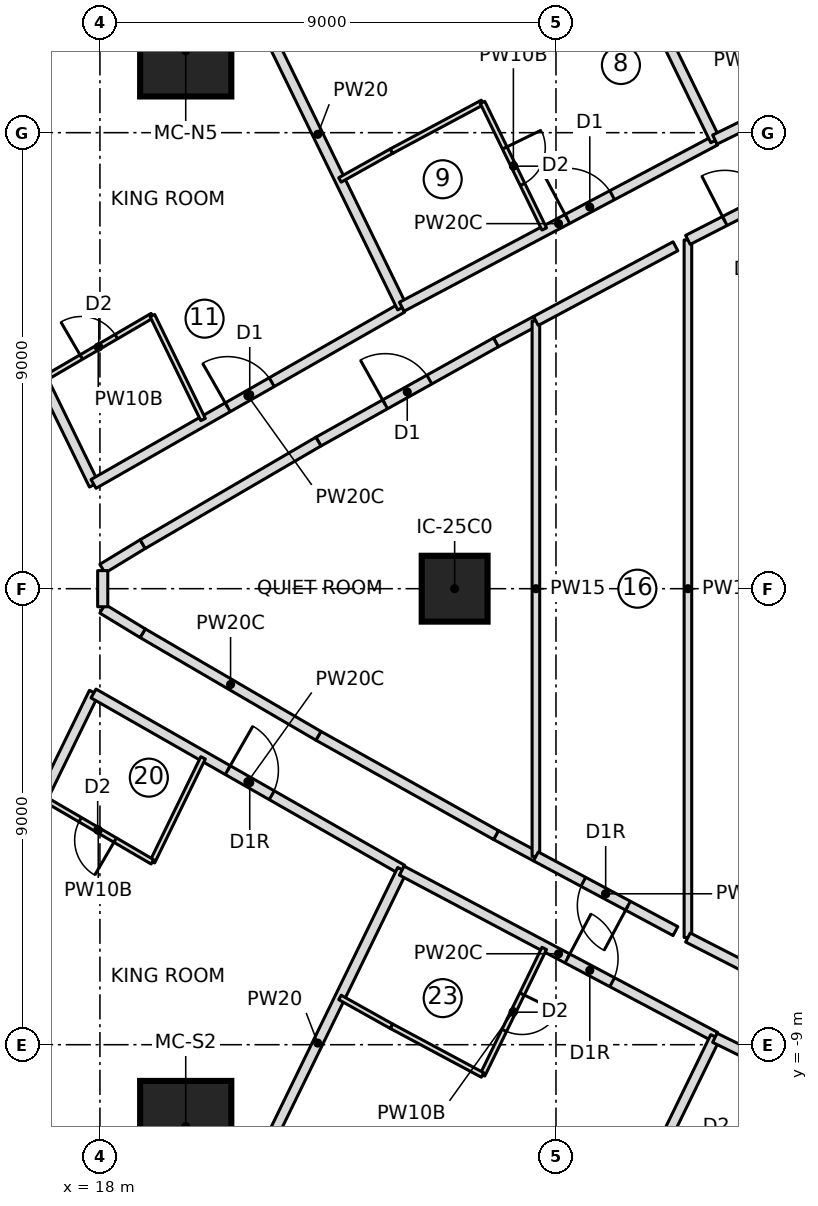
"""IFC4 building model, lengths in metres.
Left out: names, types, materials, properties, quantities, classifications, styles, units other than length and angle.
Written with IfcOpenShell. Run it as: python <this file> out.ifc"""

import sys

from ifc_helpers import new_model, si_unit, direction, frame, frame_2d, origin, origin_2d, place, context, subcontext, project, spatial, rectangle, extrude, element, fill, save


model = new_model("IFC4")
c1 = context("Model", 3, precision=1e-05, world=origin(), true_north=direction((0.0, 1.0)))
c2 = subcontext(c1, "Body", "Model", "MODEL_VIEW")
j1 = project(units=[si_unit("LENGTHUNIT", "METRE"), si_unit("PLANEANGLEUNIT", "RADIAN")], contexts=[c1])
p1 = place(None, origin())
s1 = spatial("IfcSite", under=j1, at=p1, CompositionType="ELEMENT")
p2 = place(p1, origin())
s2 = spatial("IfcBuilding", under=s1, at=p2, CompositionType="ELEMENT")
p3 = place(p2, frame((0.0, 0.0, 68.0)))
s3 = spatial("IfcBuildingStorey", under=s2, at=p3, CompositionType="ELEMENT", Elevation=68.0)
for number, where, z_axis, x_axis in (
    (1, (19.693, -10.615, 0.0), (0.0, 0.0, 1.0), (1.0, 0.0, 0.0)),
    (2, (19.693, 10.615, 0.0), (0.0, 0.0, 1.0), (1.0, 0.0, 0.0)),
):
    element("IfcColumn", number, at=place(p3, frame(where, z_axis=z_axis, x_axis=x_axis)), inside=s3, PredefinedType="COLUMN", context=c2, shape_type="SweptSolid", body=[
        extrude(rectangle(XDim=1.8, YDim=1.8, at=origin_2d()), origin(), (0.0, 0.0, 1.0), 3.55),
    ])
p4 = place(p3, frame((25.0, 0.0, 0.0), z_axis=(0.0, 0.0, 1.0), x_axis=(1.0, 0.0, 0.0)))
e3 = element("IfcColumn", 3, at=p4, inside=s3, PredefinedType="COLUMN", context=c2, shape_type="SweptSolid", body=[
    extrude(rectangle(XDim=1.3, YDim=1.3, at=origin_2d()), origin(), (0.0, 0.0, 1.0), 3.55),
])
p5 = place(p3, frame((17.882, 2.05, 0.0), z_axis=(0.0, 0.0, 1.0), x_axis=(-0.438213564788, 0.898870887078, 0.0)))
e4 = element("IfcWall", 4, at=p5, inside=s3, PredefinedType="PARTITIONING", context=c2, shape_type="SweptSolid", body=[
    extrude(rectangle(XDim=7.625, YDim=0.2, at=frame_2d((3.813, 0.0))), origin(), (0.0, 0.0, 1.0), 3.25),
])
p6 = place(p3, frame((17.874, 2.068, 0.0), z_axis=(0.0, 0.0, 1.0), x_axis=(0.868427275315, 0.495816566373, 0.0)))
e5 = element("IfcWall", 5, at=p6, inside=s3, PredefinedType="PARTITIONING", context=c2, shape_type="SweptSolid", body=[
    extrude(rectangle(XDim=7.015, YDim=0.2, at=frame_2d((3.507, 0.0))), origin(), (0.0, 0.0, 1.0), 3.25),
])
p7 = place(p6, frame((3.05, 0.0, 0.0)))
e6 = element("IfcOpeningElement", 6, at=p7, cuts=e5, PredefinedType="OPENING", context=c2, shape_type="SweptSolid", body=[
    extrude(rectangle(XDim=1.0, YDim=2.1, at=frame_2d((0.5, 1.05))), frame((0.0, 0.11, 0.0), z_axis=(0.0, -1.0, 0.0), x_axis=(1.0, 0.0, 0.0)), (0.0, 0.0, 1.0), 0.22),
])
p8 = place(p3, frame((16.898, 4.144, 0.0), z_axis=(0.0, 0.0, 1.0), x_axis=(0.863707305865, 0.503993739837, 0.0)))
e7 = element("IfcWall", 7, at=p8, inside=s3, PredefinedType="PARTITIONING", context=c2, shape_type="SweptSolid", body=[
    extrude(rectangle(XDim=2.474, YDim=0.1, at=frame_2d((1.237, 0.0))), origin(), (0.0, 0.0, 1.0), 3.25),
])
p9 = place(p8, frame((0.85, 0.0, 0.0)))
e8 = element("IfcOpeningElement", 8, at=p9, cuts=e7, PredefinedType="OPENING", context=c2, shape_type="SweptSolid", body=[
    extrude(rectangle(XDim=0.8, YDim=2.1, at=frame_2d((0.4, 1.05))), frame((0.0, 0.06, 0.0), z_axis=(0.0, -1.0, 0.0), x_axis=(1.0, 0.0, 0.0)), (0.0, 0.0, 1.0), 0.12),
])
p10 = place(p3, frame((19.035, 5.39, 0.0), z_axis=(0.0, 0.0, 1.0), x_axis=(0.438122322582, -0.898915363344, 0.0)))
e9 = element("IfcWall", 9, at=p10, inside=s3, PredefinedType="PARTITIONING", context=c2, shape_type="SweptSolid", body=[
    extrude(rectangle(XDim=2.283, YDim=0.1, at=frame_2d((1.142, 0.0))), origin(), (0.0, 0.0, 1.0), 3.25),
])
p11 = place(p3, frame((23.965, 5.546, 0.0), z_axis=(0.0, 0.0, 1.0), x_axis=(-0.438184754816, 0.898884931816, 0.0)))
e10 = element("IfcWall", 10, at=p11, inside=s3, PredefinedType="PARTITIONING", context=c2, shape_type="SweptSolid", body=[
    extrude(rectangle(XDim=7.612, YDim=0.2, at=frame_2d((3.806, 0.0))), origin(), (0.0, 0.0, 1.0), 3.25),
])
p12 = place(p3, frame((23.957, 5.564, 0.0), z_axis=(0.0, 0.0, 1.0), x_axis=(0.883455325405, 0.468515408513, 0.0)))
e11 = element("IfcWall", 11, at=p12, inside=s3, PredefinedType="PARTITIONING", context=c2, shape_type="SweptSolid", body=[
    extrude(rectangle(XDim=7.004, YDim=0.2, at=frame_2d((3.502, 0.0))), origin(), (0.0, 0.0, 1.0), 3.25),
])
p13 = place(p12, frame((3.7, 0.0, 0.0)))
e12 = element("IfcOpeningElement", 12, at=p13, cuts=e11, PredefinedType="OPENING", context=c2, shape_type="SweptSolid", body=[
    extrude(rectangle(XDim=1.0, YDim=2.1, at=frame_2d((0.5, 1.05))), frame((0.0, 0.11, 0.0), z_axis=(0.0, -1.0, 0.0), x_axis=(1.0, 0.0, 0.0)), (0.0, 0.0, 1.0), 0.22),
])
p14 = place(p3, frame((22.737, 8.067, 0.0), z_axis=(0.0, 0.0, 1.0), x_axis=(0.872799020153, 0.488079778745, 0.0)))
e13 = element("IfcWall", 13, at=p14, inside=s3, PredefinedType="PARTITIONING", context=c2, shape_type="SweptSolid", body=[
    extrude(rectangle(XDim=1.165, YDim=0.1, at=frame_2d((0.582, 0.0))), origin(), (0.0, 0.0, 1.0), 3.25),
])
p15 = place(p3, frame((23.753, 8.635, 0.0), z_axis=(0.0, 0.0, 1.0), x_axis=(0.881675736231, 0.471855800156, 0.0)))
e14 = element("IfcWall", 14, at=p15, inside=s3, PredefinedType="PARTITIONING", context=c2, shape_type="SweptSolid", body=[
    extrude(rectangle(XDim=2.039, YDim=0.1, at=frame_2d((1.019, 0.0))), origin(), (0.0, 0.0, 1.0), 3.25),
])
p16 = place(p3, frame((25.55, 9.597, 0.0), z_axis=(0.0, 0.0, 1.0), x_axis=(0.43822975423, -0.898862994292, 0.0)))
e15 = element("IfcWall", 15, at=p16, inside=s3, PredefinedType="PARTITIONING", context=c2, shape_type="SweptSolid", body=[
    extrude(rectangle(XDim=2.779, YDim=0.1, at=frame_2d((1.389, 0.0))), origin(), (0.0, 0.0, 1.0), 3.25),
])
p17 = place(p16, frame((1.0, 0.0, 0.0)))
e16 = element("IfcOpeningElement", 16, at=p17, cuts=e15, PredefinedType="OPENING", context=c2, shape_type="SweptSolid", body=[
    extrude(rectangle(XDim=0.8, YDim=2.1, at=frame_2d((0.4, 1.05))), frame((0.0, 0.06, 0.0), z_axis=(0.0, -1.0, 0.0), x_axis=(1.0, 0.0, 0.0)), (0.0, 0.0, 1.0), 0.12),
])
p18 = place(p3, frame((30.144, 8.846, 0.0), z_axis=(0.0, 0.0, 1.0), x_axis=(-0.438185054829, 0.898884785567, 0.0)))
e17 = element("IfcWall", 17, at=p18, inside=s3, PredefinedType="PARTITIONING", context=c2, shape_type="SweptSolid", body=[
    extrude(rectangle(XDim=7.601, YDim=0.2, at=frame_2d((3.801, 0.0))), origin(), (0.0, 0.0, 1.0), 3.25),
])
p19 = place(p3, frame((30.135, 8.864, 0.0), z_axis=(0.0, 0.0, 1.0), x_axis=(0.897599118183, 0.44081268475, 0.0)))
e18 = element("IfcWall", 18, at=p19, inside=s3, PredefinedType="PARTITIONING", context=c2, shape_type="SweptSolid", body=[
    extrude(rectangle(XDim=7.0, YDim=0.2, at=frame_2d((3.5, 0.0))), origin(), (0.0, 0.0, 1.0), 3.25),
])
p20 = place(p19, frame((4.25, 0.0, 0.0)))
e19 = element("IfcOpeningElement", 19, at=p20, cuts=e18, PredefinedType="OPENING", context=c2, shape_type="SweptSolid", body=[
    extrude(rectangle(XDim=1.0, YDim=2.1, at=frame_2d((0.5, 1.05))), frame((0.0, 0.11, 0.0), z_axis=(0.0, -1.0, 0.0), x_axis=(1.0, 0.0, 0.0)), (0.0, 0.0, 1.0), 0.22),
])
p21 = place(p3, frame((14.541, -8.904, 0.0), z_axis=(0.0, 0.0, 1.0), x_axis=(0.438213564788, 0.898870887078, 0.0)))
e20 = element("IfcWall", 20, at=p21, inside=s3, PredefinedType="PARTITIONING", context=c2, shape_type="SweptSolid", body=[
    extrude(rectangle(XDim=7.625, YDim=0.2, at=frame_2d((3.813, 0.0))), origin(), (0.0, 0.0, 1.0), 3.25),
])
p22 = place(p3, frame((17.874, -2.068, 0.0), z_axis=(0.0, 0.0, 1.0), x_axis=(0.868427275315, -0.495816566373, 0.0)))
e21 = element("IfcWall", 21, at=p22, inside=s3, PredefinedType="PARTITIONING", context=c2, shape_type="SweptSolid", body=[
    extrude(rectangle(XDim=7.015, YDim=0.2, at=frame_2d((3.507, 0.0))), origin(), (0.0, 0.0, 1.0), 3.25),
])
p23 = place(p22, frame((3.05, 0.0, 0.0)))
e22 = element("IfcOpeningElement", 22, at=p23, cuts=e21, PredefinedType="OPENING", context=c2, shape_type="SweptSolid", body=[
    extrude(rectangle(XDim=1.0, YDim=2.1, at=frame_2d((0.5, 1.05))), frame((0.0, 0.11, 0.0), z_axis=(0.0, -1.0, 0.0), x_axis=(1.0, 0.0, 0.0)), (0.0, 0.0, 1.0), 0.22),
])
p24 = place(p3, frame((20.035, -3.338, 0.0), z_axis=(0.0, 0.0, 1.0), x_axis=(-0.438122322582, -0.898915363344, 0.0)))
e23 = element("IfcWall", 23, at=p24, inside=s3, PredefinedType="PARTITIONING", context=c2, shape_type="SweptSolid", body=[
    extrude(rectangle(XDim=2.283, YDim=0.1, at=frame_2d((1.142, 0.0))), origin(), (0.0, 0.0, 1.0), 3.25),
])
p25 = place(p3, frame((19.035, -5.39, 0.0), z_axis=(0.0, 0.0, 1.0), x_axis=(-0.863707305865, 0.503993739837, 0.0)))
e24 = element("IfcWall", 24, at=p25, inside=s3, PredefinedType="PARTITIONING", context=c2, shape_type="SweptSolid", body=[
    extrude(rectangle(XDim=2.474, YDim=0.1, at=frame_2d((1.237, 0.0))), origin(), (0.0, 0.0, 1.0), 3.25),
])
p26 = place(p25, frame((0.85, 0.0, 0.0)))
e25 = element("IfcOpeningElement", 25, at=p26, cuts=e24, PredefinedType="OPENING", context=c2, shape_type="SweptSolid", body=[
    extrude(rectangle(XDim=0.8, YDim=2.1, at=frame_2d((0.4, 1.05))), frame((0.0, 0.06, 0.0), z_axis=(0.0, -1.0, 0.0), x_axis=(1.0, 0.0, 0.0)), (0.0, 0.0, 1.0), 0.12),
])
p27 = place(p3, frame((20.63, -12.388, 0.0), z_axis=(0.0, 0.0, 1.0), x_axis=(0.438184754816, 0.898884931816, 0.0)))
e26 = element("IfcWall", 26, at=p27, inside=s3, PredefinedType="PARTITIONING", context=c2, shape_type="SweptSolid", body=[
    extrude(rectangle(XDim=7.612, YDim=0.2, at=frame_2d((3.806, 0.0))), origin(), (0.0, 0.0, 1.0), 3.25),
])
p28 = place(p3, frame((23.957, -5.564, 0.0), z_axis=(0.0, 0.0, 1.0), x_axis=(0.883455325405, -0.468515408513, 0.0)))
e27 = element("IfcWall", 27, at=p28, inside=s3, PredefinedType="PARTITIONING", context=c2, shape_type="SweptSolid", body=[
    extrude(rectangle(XDim=7.004, YDim=0.2, at=frame_2d((3.502, 0.0))), origin(), (0.0, 0.0, 1.0), 3.25),
])
p29 = place(p28, frame((3.7, 0.0, 0.0)))
e28 = element("IfcOpeningElement", 28, at=p29, cuts=e27, PredefinedType="OPENING", context=c2, shape_type="SweptSolid", body=[
    extrude(rectangle(XDim=1.0, YDim=2.1, at=frame_2d((0.5, 1.05))), frame((0.0, 0.11, 0.0), z_axis=(0.0, -1.0, 0.0), x_axis=(1.0, 0.0, 0.0)), (0.0, 0.0, 1.0), 0.22),
])
p30 = place(p3, frame((26.768, -7.1, 0.0), z_axis=(0.0, 0.0, 1.0), x_axis=(-0.43822975423, -0.898862994292, 0.0)))
e29 = element("IfcWall", 29, at=p30, inside=s3, PredefinedType="PARTITIONING", context=c2, shape_type="SweptSolid", body=[
    extrude(rectangle(XDim=2.779, YDim=0.1, at=frame_2d((1.389, 0.0))), origin(), (0.0, 0.0, 1.0), 3.25),
])
p31 = place(p30, frame((1.0, 0.0, 0.0)))
e30 = element("IfcOpeningElement", 30, at=p31, cuts=e29, PredefinedType="OPENING", context=c2, shape_type="SweptSolid", body=[
    extrude(rectangle(XDim=0.8, YDim=2.1, at=frame_2d((0.4, 1.05))), frame((0.0, 0.06, 0.0), z_axis=(0.0, -1.0, 0.0), x_axis=(1.0, 0.0, 0.0)), (0.0, 0.0, 1.0), 0.12),
])
p32 = place(p3, frame((25.55, -9.597, 0.0), z_axis=(0.0, 0.0, 1.0), x_axis=(-0.881675736231, 0.471855800156, 0.0)))
e31 = element("IfcWall", 31, at=p32, inside=s3, PredefinedType="PARTITIONING", context=c2, shape_type="SweptSolid", body=[
    extrude(rectangle(XDim=2.039, YDim=0.1, at=frame_2d((1.019, 0.0))), origin(), (0.0, 0.0, 1.0), 3.25),
])
p33 = place(p3, frame((23.753, -8.635, 0.0), z_axis=(0.0, 0.0, 1.0), x_axis=(-0.872799020153, 0.488079778745, 0.0)))
e32 = element("IfcWall", 32, at=p33, inside=s3, PredefinedType="PARTITIONING", context=c2, shape_type="SweptSolid", body=[
    extrude(rectangle(XDim=1.165, YDim=0.1, at=frame_2d((0.582, 0.0))), origin(), (0.0, 0.0, 1.0), 3.25),
])
p34 = place(p3, frame((26.813, -15.678, 0.0), z_axis=(0.0, 0.0, 1.0), x_axis=(0.438185054829, 0.898884785567, 0.0)))
e33 = element("IfcWall", 33, at=p34, inside=s3, PredefinedType="PARTITIONING", context=c2, shape_type="SweptSolid", body=[
    extrude(rectangle(XDim=7.601, YDim=0.2, at=frame_2d((3.801, 0.0))), origin(), (0.0, 0.0, 1.0), 3.25),
])
p35 = place(p3, frame((30.135, -8.864, 0.0), z_axis=(0.0, 0.0, 1.0), x_axis=(0.897599118183, -0.44081268475, 0.0)))
e34 = element("IfcWall", 34, at=p35, inside=s3, PredefinedType="PARTITIONING", context=c2, shape_type="SweptSolid", body=[
    extrude(rectangle(XDim=7.0, YDim=0.2, at=frame_2d((3.5, 0.0))), origin(), (0.0, 0.0, 1.0), 3.25),
])
p36 = place(p35, frame((4.25, 0.0, 0.0)))
e35 = element("IfcOpeningElement", 35, at=p36, cuts=e34, PredefinedType="OPENING", context=c2, shape_type="SweptSolid", body=[
    extrude(rectangle(XDim=1.0, YDim=2.1, at=frame_2d((0.5, 1.05))), frame((0.0, 0.11, 0.0), z_axis=(0.0, -1.0, 0.0), x_axis=(1.0, 0.0, 0.0)), (0.0, 0.0, 1.0), 0.22),
])
p37 = place(p3, frame((22.312, 2.903, 0.0), z_axis=(0.0, 0.0, 1.0), x_axis=(0.872800289292, 0.488077509225, 0.0)))
e36 = element("IfcWall", 36, at=p37, inside=s3, PredefinedType="PARTITIONING", context=c2, shape_type="SweptSolid", body=[
    extrude(rectangle(XDim=4.016, YDim=0.2, at=frame_2d((2.008, 0.0))), origin(), (0.0, 0.0, 1.0), 3.25),
])
p38 = place(p37, frame((1.508, 0.0, 0.0)))
e37 = element("IfcOpeningElement", 37, at=p38, cuts=e36, PredefinedType="OPENING", context=c2, shape_type="SweptSolid", body=[
    extrude(rectangle(XDim=1.0, YDim=2.1, at=frame_2d((0.5, 1.05))), frame((0.0, 0.11, 0.0), z_axis=(0.0, -1.0, 0.0), x_axis=(1.0, 0.0, 0.0)), (0.0, 0.0, 1.0), 0.22),
])
p39 = place(p3, frame((26.604, -5.284, 0.0), z_axis=(0.0, 0.0, 1.0), x_axis=(-0.881715816073, 0.471780902207, 0.0)))
e38 = element("IfcWall", 38, at=p39, inside=s3, PredefinedType="PARTITIONING", context=c2, shape_type="SweptSolid", body=[
    extrude(rectangle(XDim=0.892, YDim=0.2, at=frame_2d((0.446, 0.0))), origin(), (0.0, 0.0, 1.0), 3.25),
])
p40 = place(p3, frame((25.817, -4.863, 0.0), z_axis=(0.0, 0.0, 1.0), x_axis=(-0.872800289292, 0.488077509225, 0.0)))
e39 = element("IfcWall", 39, at=p40, inside=s3, PredefinedType="PARTITIONING", context=c2, shape_type="SweptSolid", body=[
    extrude(rectangle(XDim=4.016, YDim=0.2, at=frame_2d((2.008, 0.0))), origin(), (0.0, 0.0, 1.0), 3.25),
])
p41 = place(p3, frame((22.312, -2.903, 0.0), z_axis=(0.0, 0.0, 1.0), x_axis=(-0.863710538269, 0.503988200341, 0.0)))
e40 = element("IfcWall", 40, at=p41, inside=s3, PredefinedType="PARTITIONING", context=c2, shape_type="SweptSolid", body=[
    extrude(rectangle(XDim=4.016, YDim=0.2, at=frame_2d((2.008, 0.0))), origin(), (0.0, 0.0, 1.0), 3.25),
])
for number, where, z_axis, x_axis in (
    (41, (18.844, -0.879, 0.0), (0.0, 0.0, 1.0), (-0.854, 0.52, 0.0)),
    (42, (18.05, 0.396, 0.0), (0.0, 0.0, 1.0), (0.854, 0.52, 0.0)),
):
    element("IfcWall", number, at=place(p3, frame(where, z_axis=z_axis, x_axis=x_axis)), inside=s3, PredefinedType="PARTITIONING", context=c2, shape_type="SweptSolid", body=[
        extrude(rectangle(XDim=0.929, YDim=0.2, at=frame_2d((0.464, 0.0))), origin(), (0.0, 0.0, 1.0), 3.25),
    ])
p42 = place(p3, frame((18.844, 0.879, 0.0), z_axis=(0.0, 0.0, 1.0), x_axis=(0.863710538269, 0.503988200341, 0.0)))
e43 = element("IfcWall", 43, at=p42, inside=s3, PredefinedType="PARTITIONING", context=c2, shape_type="SweptSolid", body=[
    extrude(rectangle(XDim=4.016, YDim=0.2, at=frame_2d((2.008, 0.0))), origin(), (0.0, 0.0, 1.0), 3.25),
])
p43 = place(p3, frame((25.817, 4.863, 0.0), z_axis=(0.0, 0.0, 1.0), x_axis=(0.881715816073, 0.471780902207, 0.0)))
e44 = element("IfcWall", 44, at=p43, inside=s3, PredefinedType="PARTITIONING", context=c2, shape_type="SweptSolid", body=[
    extrude(rectangle(XDim=0.892, YDim=0.2, at=frame_2d((0.446, 0.0))), origin(), (0.0, 0.0, 1.0), 3.25),
])
p44 = place(p3, frame((26.604, -5.284, 0.0), z_axis=(0.0, 0.0, 1.0), x_axis=(0.0, 1.0, 0.0)))
e45 = element("IfcWall", 45, at=p44, inside=s3, PredefinedType="PARTITIONING", context=c2, shape_type="SweptSolid", body=[
    extrude(rectangle(XDim=10.568, YDim=0.15, at=frame_2d((5.284, 0.0))), origin(), (0.0, 0.0, 1.0), 3.25),
])
p45 = place(p3, frame((29.357, -6.758, 0.0), z_axis=(0.0, 0.0, 1.0), x_axis=(-0.881637943627, 0.471926409895, 0.0)))
e46 = element("IfcWall", 46, at=p45, inside=s3, PredefinedType="PARTITIONING", context=c2, shape_type="SweptSolid", body=[
    extrude(rectangle(XDim=3.124, YDim=0.2, at=frame_2d((1.562, 0.0))), origin(), (0.0, 0.0, 1.0), 3.25),
])
p46 = place(p45, frame((1.062, 0.0, 0.0)))
e47 = element("IfcOpeningElement", 47, at=p46, cuts=e46, PredefinedType="OPENING", context=c2, shape_type="SweptSolid", body=[
    extrude(rectangle(XDim=1.0, YDim=2.1, at=frame_2d((0.5, 1.05))), frame((0.0, 0.11, 0.0), z_axis=(0.0, -1.0, 0.0), x_axis=(1.0, 0.0, 0.0)), (0.0, 0.0, 1.0), 0.22),
])
p47 = place(p3, frame((26.604, 5.284, 0.0), z_axis=(0.0, 0.0, 1.0), x_axis=(0.881637943627, 0.471926409895, 0.0)))
e48 = element("IfcWall", 48, at=p47, inside=s3, PredefinedType="PARTITIONING", context=c2, shape_type="SweptSolid", body=[
    extrude(rectangle(XDim=3.124, YDim=0.2, at=frame_2d((1.562, 0.0))), origin(), (0.0, 0.0, 1.0), 3.25),
])
p48 = place(p3, frame((29.604, -6.884, 0.0), z_axis=(0.0, 0.0, 1.0), x_axis=(0.0, 1.0, 0.0)))
e49 = element("IfcWall", 49, at=p48, inside=s3, PredefinedType="PARTITIONING", context=c2, shape_type="SweptSolid", body=[
    extrude(rectangle(XDim=13.768, YDim=0.15, at=frame_2d((6.884, 0.0))), origin(), (0.0, 0.0, 1.0), 3.25),
])
p49 = place(p3, frame((29.604, 6.884, 0.0), z_axis=(0.0, 0.0, 1.0), x_axis=(0.890220210981, 0.455530433628, 0.0)))
e50 = element("IfcWall", 50, at=p49, inside=s3, PredefinedType="PARTITIONING", context=c2, shape_type="SweptSolid", body=[
    extrude(rectangle(XDim=2.636, YDim=0.2, at=frame_2d((1.318, 0.0))), origin(), (0.0, 0.0, 1.0), 3.25),
])
p50 = place(p49, frame((0.818, 0.0, 0.0)))
e51 = element("IfcOpeningElement", 51, at=p50, cuts=e50, PredefinedType="OPENING", context=c2, shape_type="SweptSolid", body=[
    extrude(rectangle(XDim=1.0, YDim=2.1, at=frame_2d((0.5, 1.05))), frame((0.0, 0.11, 0.0), z_axis=(0.0, -1.0, 0.0), x_axis=(1.0, 0.0, 0.0)), (0.0, 0.0, 1.0), 0.22),
])
p51 = place(p3, frame((31.95, -8.085, 0.0), z_axis=(0.0, 0.0, 1.0), x_axis=(-0.890220210981, 0.455530433628, 0.0)))
e52 = element("IfcWall", 52, at=p51, inside=s3, PredefinedType="PARTITIONING", context=c2, shape_type="SweptSolid", body=[
    extrude(rectangle(XDim=2.636, YDim=0.2, at=frame_2d((1.318, 0.0))), origin(), (0.0, 0.0, 1.0), 3.25),
])
p52 = place(p3, frame((18.055, -0.357, 0.0), z_axis=(0.0, 0.0, 1.0), x_axis=(0.0, 1.0, 0.0)))
e53 = element("IfcWall", 53, at=p52, inside=s3, PredefinedType="PARTITIONING", context=c2, shape_type="SweptSolid", body=[
    extrude(rectangle(XDim=0.713, YDim=0.2, at=frame_2d((0.357, 0.0))), origin(), (0.0, 0.0, 1.0), 3.25),
])
p53 = place(p9, origin())
e54 = element("IfcDoor", 54, at=p53, inside=s3, OperationType="SINGLE_SWING_LEFT", PredefinedType="DOOR", context=c2, shape_type="SweptSolid", body=[
    extrude(rectangle(XDim=0.8, YDim=2.1, at=frame_2d((0.4, 1.05))), frame((0.0, 0.025, 0.0), z_axis=(0.0, -1.0, 0.0), x_axis=(1.0, 0.0, 0.0)), (0.0, 0.0, 1.0), 0.05),
])
fill(e8, e54)
p54 = place(p7, origin())
e55 = element("IfcDoor", 55, at=p54, inside=s3, OperationType="SINGLE_SWING_LEFT", PredefinedType="DOOR", context=c2, shape_type="SweptSolid", body=[
    extrude(rectangle(XDim=1.0, YDim=2.1, at=frame_2d((0.5, 1.05))), frame((0.0, 0.025, 0.0), z_axis=(0.0, -1.0, 0.0), x_axis=(1.0, 0.0, 0.0)), (0.0, 0.0, 1.0), 0.05),
])
fill(e6, e55)
p55 = place(p17, origin())
e56 = element("IfcDoor", 56, at=p55, inside=s3, OperationType="SINGLE_SWING_LEFT", PredefinedType="DOOR", context=c2, shape_type="SweptSolid", body=[
    extrude(rectangle(XDim=0.8, YDim=2.1, at=frame_2d((0.4, 1.05))), frame((0.0, 0.025, 0.0), z_axis=(0.0, -1.0, 0.0), x_axis=(1.0, 0.0, 0.0)), (0.0, 0.0, 1.0), 0.05),
])
fill(e16, e56)
p56 = place(p13, origin())
e57 = element("IfcDoor", 57, at=p56, inside=s3, OperationType="SINGLE_SWING_LEFT", PredefinedType="DOOR", context=c2, shape_type="SweptSolid", body=[
    extrude(rectangle(XDim=1.0, YDim=2.1, at=frame_2d((0.5, 1.05))), frame((0.0, 0.025, 0.0), z_axis=(0.0, -1.0, 0.0), x_axis=(1.0, 0.0, 0.0)), (0.0, 0.0, 1.0), 0.05),
])
fill(e12, e57)
p57 = place(p26, origin())
e58 = element("IfcDoor", 58, at=p57, inside=s3, OperationType="SINGLE_SWING_LEFT", PredefinedType="DOOR", context=c2, shape_type="SweptSolid", body=[
    extrude(rectangle(XDim=0.8, YDim=2.1, at=frame_2d((0.4, 1.05))), frame((0.0, 0.025, 0.0), z_axis=(0.0, -1.0, 0.0), x_axis=(1.0, 0.0, 0.0)), (0.0, 0.0, 1.0), 0.05),
])
fill(e25, e58)
p58 = place(p23, origin())
e59 = element("IfcDoor", 59, at=p58, inside=s3, OperationType="SINGLE_SWING_RIGHT", PredefinedType="DOOR", context=c2, shape_type="SweptSolid", body=[
    extrude(rectangle(XDim=1.0, YDim=2.1, at=frame_2d((0.5, 1.05))), frame((0.0, 0.025, 0.0), z_axis=(0.0, -1.0, 0.0), x_axis=(1.0, 0.0, 0.0)), (0.0, 0.0, 1.0), 0.05),
])
fill(e22, e59)
p59 = place(p31, origin())
e60 = element("IfcDoor", 60, at=p59, inside=s3, OperationType="SINGLE_SWING_LEFT", PredefinedType="DOOR", context=c2, shape_type="SweptSolid", body=[
    extrude(rectangle(XDim=0.8, YDim=2.1, at=frame_2d((0.4, 1.05))), frame((0.0, 0.025, 0.0), z_axis=(0.0, -1.0, 0.0), x_axis=(1.0, 0.0, 0.0)), (0.0, 0.0, 1.0), 0.05),
])
fill(e30, e60)
p60 = place(p29, origin())
e61 = element("IfcDoor", 61, at=p60, inside=s3, OperationType="SINGLE_SWING_RIGHT", PredefinedType="DOOR", context=c2, shape_type="SweptSolid", body=[
    extrude(rectangle(XDim=1.0, YDim=2.1, at=frame_2d((0.5, 1.05))), frame((0.0, 0.025, 0.0), z_axis=(0.0, -1.0, 0.0), x_axis=(1.0, 0.0, 0.0)), (0.0, 0.0, 1.0), 0.05),
])
fill(e28, e61)
p61 = place(p38, origin())
e62 = element("IfcDoor", 62, at=p61, inside=s3, OperationType="SINGLE_SWING_LEFT", PredefinedType="DOOR", context=c2, shape_type="SweptSolid", body=[
    extrude(rectangle(XDim=1.0, YDim=2.1, at=frame_2d((0.5, 1.05))), frame((0.0, 0.025, 0.0), z_axis=(0.0, -1.0, 0.0), x_axis=(1.0, 0.0, 0.0)), (0.0, 0.0, 1.0), 0.05),
])
fill(e37, e62)
p62 = place(p46, origin())
e63 = element("IfcDoor", 63, at=p62, inside=s3, OperationType="SINGLE_SWING_RIGHT", PredefinedType="DOOR", context=c2, shape_type="SweptSolid", body=[
    extrude(rectangle(XDim=1.0, YDim=2.1, at=frame_2d((0.5, 1.05))), frame((0.0, 0.025, 0.0), z_axis=(0.0, -1.0, 0.0), x_axis=(1.0, 0.0, 0.0)), (0.0, 0.0, 1.0), 0.05),
])
fill(e47, e63)
p63 = place(p50, origin())
e64 = element("IfcDoor", 64, at=p63, inside=s3, OperationType="SINGLE_SWING_LEFT", PredefinedType="DOOR", context=c2, shape_type="SweptSolid", body=[
    extrude(rectangle(XDim=1.0, YDim=2.1, at=frame_2d((0.5, 1.05))), frame((0.0, 0.025, 0.0), z_axis=(0.0, -1.0, 0.0), x_axis=(1.0, 0.0, 0.0)), (0.0, 0.0, 1.0), 0.05),
])
fill(e51, e64)
save(model, sys.argv[1])
